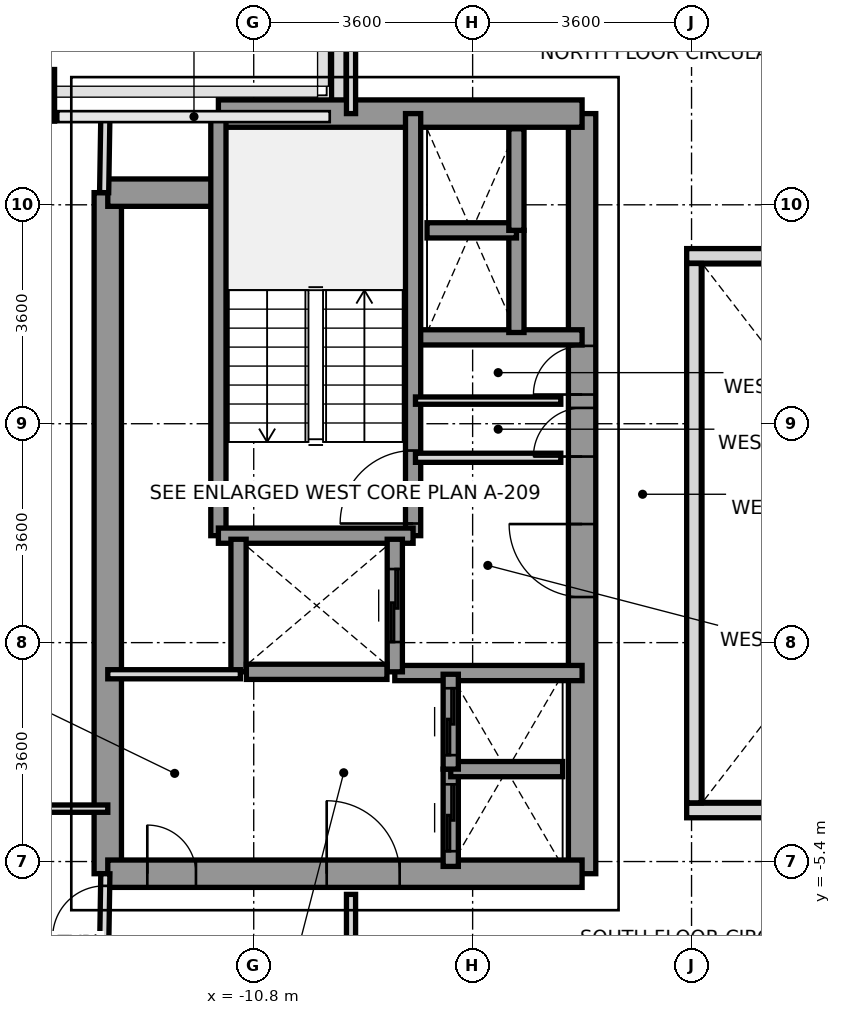
"""IFC4 building model, lengths in metres.
Left out: names, types, materials, properties, quantities, classifications, styles, units other than length and angle.
Written with IfcOpenShell. Run it as: python <this file> out.ifc"""

import sys

from ifc_helpers import new_model, si_unit, direction, frame, frame_2d, origin, origin_2d, place, context, subcontext, project, spatial, rectangle, extrude, source, transform, mapped, element, fill, save


model = new_model("IFC4")
c1 = context("Model", 3, precision=1e-05, world=origin(), true_north=direction((0.0, 1.0)))
c2 = subcontext(c1, "Body", "Model", "MODEL_VIEW")
j1 = project(units=[si_unit("LENGTHUNIT", "METRE"), si_unit("PLANEANGLEUNIT", "RADIAN")], contexts=[c1])
p1 = place(None, origin())
s1 = spatial("IfcSite", under=j1, at=p1, CompositionType="ELEMENT")
p2 = place(p1, origin())
s2 = spatial("IfcBuilding", under=s1, at=p2, CompositionType="ELEMENT")
p3 = place(p2, frame((0.0, 0.0, 114.2)))
s3 = spatial("IfcBuildingStorey", under=s2, at=p3, CompositionType="ELEMENT", Elevation=114.2)
m1 = source(origin(), c2, "Body", "SweptSolid", [
    extrude(rectangle(XDim=0.65, YDim=0.85, at=origin_2d()), origin(), (0.0, 0.0, 1.0), 3.2),
])
p4 = place(p3, frame((-14.4, 7.2, 0.0), z_axis=(0.0, 0.0, 1.0), x_axis=(1.0, 0.0, 0.0)))
e1 = element("IfcColumn", 1, at=p4, inside=s3, PredefinedType="COLUMN", context=c2, shape_type="MappedRepresentation", body=[
    mapped(m1, transform((0.0, 0.0, 0.0), x_axis=(1.0, 0.0, 0.0), y_axis=(0.0, 1.0, 0.0), z_axis=(0.0, 0.0, 1.0), scale=1.0)),
])
p5 = place(p3, frame((-9.4, 6.953, 0.0), z_axis=(0.0, 0.0, 1.0), x_axis=(0.0, 1.0, 0.0)))
e2 = element("IfcWall", 2, at=p5, inside=s3, PredefinedType="PARAPET", context=c2, shape_type="SweptSolid", body=[
    extrude(rectangle(XDim=1.519, YDim=0.24, at=frame_2d((0.76, 0.0))), origin(), (0.0, 0.0, 1.0), 1.15),
])
p6 = place(p3, frame((-13.2, -5.6, 0.0), z_axis=(0.0, 0.0, 1.0), x_axis=(0.0, 1.0, 0.0)))
e3 = element("IfcWall", 3, at=p6, inside=s3, PredefinedType="SHEAR", context=c2, shape_type="SweptSolid", body=[
    extrude(rectangle(XDim=11.2, YDim=0.45, at=frame_2d((5.6, 0.0))), origin(), (0.0, 0.0, 1.0), 3.2),
])
p7 = place(p3, frame((-5.4, -5.6, 0.0), z_axis=(0.0, 0.0, 1.0), x_axis=(0.0, 1.0, 0.0)))
e4 = element("IfcWall", 4, at=p7, inside=s3, PredefinedType="SHEAR", context=c2, shape_type="SweptSolid", body=[
    extrude(rectangle(XDim=12.5, YDim=0.45, at=frame_2d((6.25, 0.0))), origin(), (0.0, 0.0, 1.0), 3.2),
])
p8 = place(p7, frame((4.55, 0.0, 0.0)))
e5 = element("IfcOpeningElement", 5, at=p8, cuts=e4, PredefinedType="OPENING", context=c2, shape_type="SweptSolid", body=[
    extrude(rectangle(XDim=1.2, YDim=2.2, at=frame_2d((0.6, 1.1))), frame((0.0, 0.235, 0.0), z_axis=(0.0, -1.0, 0.0), x_axis=(1.0, 0.0, 0.0)), (0.0, 0.0, 1.0), 0.47),
])
p9 = place(p7, frame((6.86, 0.0, 0.0)))
e6 = element("IfcOpeningElement", 6, at=p9, cuts=e4, PredefinedType="OPENING", context=c2, shape_type="SweptSolid", body=[
    extrude(rectangle(XDim=0.8, YDim=2.1, at=frame_2d((0.4, 1.05))), frame((0.0, 0.235, 0.0), z_axis=(0.0, -1.0, 0.0), x_axis=(1.0, 0.0, 0.0)), (0.0, 0.0, 1.0), 0.47),
])
p10 = place(p7, frame((7.88, 0.0, 0.0)))
e7 = element("IfcOpeningElement", 7, at=p10, cuts=e4, PredefinedType="OPENING", context=c2, shape_type="SweptSolid", body=[
    extrude(rectangle(XDim=0.8, YDim=2.1, at=frame_2d((0.4, 1.05))), frame((0.0, 0.235, 0.0), z_axis=(0.0, -1.0, 0.0), x_axis=(1.0, 0.0, 0.0)), (0.0, 0.0, 1.0), 0.47),
])
p11 = place(p3, frame((-11.381, 6.9, 0.0), z_axis=(0.0, 0.0, 1.0), x_axis=(1.0, 0.0, 0.0)))
e8 = element("IfcWall", 8, at=p11, inside=s3, PredefinedType="SHEAR", context=c2, shape_type="SweptSolid", body=[
    extrude(rectangle(XDim=5.981, YDim=0.45, at=frame_2d((2.991, 0.0))), origin(), (0.0, 0.0, 1.0), 3.2),
])
p12 = place(p3, frame((-13.2, 5.6, 0.0), z_axis=(0.0, 0.0, 1.0), x_axis=(1.0, 0.0, 0.0)))
e9 = element("IfcWall", 9, at=p12, inside=s3, PredefinedType="SHEAR", context=c2, shape_type="SweptSolid", body=[
    extrude(rectangle(XDim=1.819, YDim=0.45, at=frame_2d((0.909, 0.0))), origin(), (0.0, 0.0, 1.0), 3.2),
])
p13 = place(p3, frame((-13.2, -5.6, 0.0), z_axis=(0.0, 0.0, 1.0), x_axis=(1.0, 0.0, 0.0)))
e10 = element("IfcWall", 10, at=p13, inside=s3, PredefinedType="SHEAR", context=c2, shape_type="SweptSolid", body=[
    extrude(rectangle(XDim=7.8, YDim=0.45, at=frame_2d((3.9, 0.0))), origin(), (0.0, 0.0, 1.0), 3.2),
])
p14 = place(p13, frame((3.6, 0.0, 0.0)))
e11 = element("IfcOpeningElement", 11, at=p14, cuts=e10, PredefinedType="OPENING", context=c2, shape_type="SweptSolid", body=[
    extrude(rectangle(XDim=1.2, YDim=2.2, at=frame_2d((0.6, 1.1))), frame((0.0, 0.235, 0.0), z_axis=(0.0, -1.0, 0.0), x_axis=(1.0, 0.0, 0.0)), (0.0, 0.0, 1.0), 0.47),
])
p15 = place(p13, frame((0.65, 0.0, 0.0)))
e12 = element("IfcOpeningElement", 12, at=p15, cuts=e10, PredefinedType="OPENING", context=c2, shape_type="SweptSolid", body=[
    extrude(rectangle(XDim=0.8, YDim=2.1, at=frame_2d((0.4, 1.05))), frame((0.0, 0.235, 0.0), z_axis=(0.0, -1.0, 0.0), x_axis=(1.0, 0.0, 0.0)), (0.0, 0.0, 1.0), 0.47),
])
p16 = place(p3, frame((-8.18, 3.22, 0.0), z_axis=(0.0, 0.0, 1.0), x_axis=(1.0, 0.0, 0.0)))
e13 = element("IfcWall", 13, at=p16, inside=s3, PredefinedType="SOLIDWALL", context=c2, shape_type="SweptSolid", body=[
    extrude(rectangle(XDim=2.78, YDim=0.25, at=frame_2d((1.39, 0.0))), origin(), (0.0, 0.0, 1.0), 3.2),
])
p17 = place(p3, frame((-8.48, -2.3, 0.0), z_axis=(0.0, 0.0, 1.0), x_axis=(1.0, 0.0, 0.0)))
e14 = element("IfcWall", 14, at=p17, inside=s3, PredefinedType="SOLIDWALL", context=c2, shape_type="SweptSolid", body=[
    extrude(rectangle(XDim=3.08, YDim=0.25, at=frame_2d((1.54, 0.0))), origin(), (0.0, 0.0, 1.0), 3.2),
])
p18 = place(p3, frame((-8.179, -0.041, 0.0), z_axis=(0.0, 0.0, 1.0), x_axis=(0.0, 1.0, 0.0)))
e15 = element("IfcWall", 15, at=p18, inside=s3, PredefinedType="SOLIDWALL", context=c2, shape_type="SweptSolid", body=[
    extrude(rectangle(XDim=6.941, YDim=0.25, at=frame_2d((3.47, 0.0))), origin(), (0.0, 0.0, 1.0), 3.2),
])
p19 = place(p18, frame((0.2, 0.0, 0.0)))
e16 = element("IfcOpeningElement", 16, at=p19, cuts=e15, PredefinedType="OPENING", context=c2, shape_type="SweptSolid", body=[
    extrude(rectangle(XDim=1.2, YDim=2.2, at=frame_2d((0.6, 1.1))), frame((0.0, 0.135, 0.0), z_axis=(0.0, -1.0, 0.0), x_axis=(1.0, 0.0, 0.0)), (0.0, 0.0, 1.0), 0.27),
])
p20 = place(p3, frame((-11.381, -0.041, 0.0), z_axis=(0.0, 0.0, 1.0), x_axis=(0.0, 1.0, 0.0)))
e17 = element("IfcWall", 17, at=p20, inside=s3, PredefinedType="SOLIDWALL", context=c2, shape_type="SweptSolid", body=[
    extrude(rectangle(XDim=6.941, YDim=0.25, at=frame_2d((3.47, 0.0))), origin(), (0.0, 0.0, 1.0), 3.2),
])
p21 = place(p3, frame((-11.381, -0.041, 0.0), z_axis=(0.0, 0.0, 1.0), x_axis=(1.0, 0.0, 0.0)))
e18 = element("IfcWall", 18, at=p21, inside=s3, PredefinedType="SOLIDWALL", context=c2, shape_type="SweptSolid", body=[
    extrude(rectangle(XDim=3.202, YDim=0.25, at=frame_2d((1.601, 0.0))), origin(), (0.0, 0.0, 1.0), 3.2),
])
p22 = place(p3, frame((-11.05, -2.28, 0.0), z_axis=(0.0, 0.0, 1.0), x_axis=(0.0, 1.0, 0.0)))
e19 = element("IfcWall", 19, at=p22, inside=s3, PredefinedType="SOLIDWALL", context=c2, shape_type="SweptSolid", body=[
    extrude(rectangle(XDim=2.18, YDim=0.25, at=frame_2d((1.09, 0.0))), origin(), (0.0, 0.0, 1.0), 3.2),
])
p23 = place(p3, frame((-8.48, -2.28, 0.0), z_axis=(0.0, 0.0, 1.0), x_axis=(0.0, 1.0, 0.0)))
e20 = element("IfcWall", 20, at=p23, inside=s3, PredefinedType="SOLIDWALL", context=c2, shape_type="SweptSolid", body=[
    extrude(rectangle(XDim=2.18, YDim=0.25, at=frame_2d((1.09, 0.0))), origin(), (0.0, 0.0, 1.0), 3.2),
])
p24 = place(p23, frame((0.49, 0.0, 0.0)))
e21 = element("IfcOpeningElement", 21, at=p24, cuts=e20, PredefinedType="OPENING", context=c2, shape_type="SweptSolid", body=[
    extrude(rectangle(XDim=1.2, YDim=2.2, at=frame_2d((0.6, 1.1))), frame((0.0, 0.135, 0.0), z_axis=(0.0, -1.0, 0.0), x_axis=(1.0, 0.0, 0.0)), (0.0, 0.0, 1.0), 0.27),
])
p25 = place(p3, frame((-10.921, -2.28, 0.0), z_axis=(0.0, 0.0, 1.0), x_axis=(1.0, 0.0, 0.0)))
e22 = element("IfcWall", 22, at=p25, inside=s3, PredefinedType="SOLIDWALL", context=c2, shape_type="SweptSolid", body=[
    extrude(rectangle(XDim=2.312, YDim=0.25, at=frame_2d((1.156, 0.0))), origin(), (0.0, 0.0, 1.0), 3.2),
])
p26 = place(p3, frame((-7.56, -5.48, 0.0), z_axis=(0.0, 0.0, 1.0), x_axis=(0.0, 1.0, 0.0)))
e23 = element("IfcWall", 23, at=p26, inside=s3, PredefinedType="SOLIDWALL", context=c2, shape_type="SweptSolid", body=[
    extrude(rectangle(XDim=1.6, YDim=0.25, at=frame_2d((0.8, 0.0))), origin(), (0.0, 0.0, 1.0), 3.2),
])
p27 = place(p26, frame((0.25, 0.0, 0.0)))
e24 = element("IfcOpeningElement", 24, at=p27, cuts=e23, PredefinedType="OPENING", context=c2, shape_type="SweptSolid", body=[
    extrude(rectangle(XDim=1.1, YDim=2.2, at=frame_2d((0.55, 1.1))), frame((0.0, 0.135, 0.0), z_axis=(0.0, -1.0, 0.0), x_axis=(1.0, 0.0, 0.0)), (0.0, 0.0, 1.0), 0.27),
])
p28 = place(p3, frame((-7.56, -3.88, 0.0), z_axis=(0.0, 0.0, 1.0), x_axis=(1.0, 0.0, 0.0)))
e25 = element("IfcWall", 25, at=p28, inside=s3, PredefinedType="SOLIDWALL", context=c2, shape_type="SweptSolid", body=[
    extrude(rectangle(XDim=1.84, YDim=0.25, at=frame_2d((0.92, 0.0))), origin(), (0.0, 0.0, 1.0), 3.2),
])
p29 = place(p3, frame((-7.56, -3.88, 0.0), z_axis=(0.0, 0.0, 1.0), x_axis=(0.0, 1.0, 0.0)))
e26 = element("IfcWall", 26, at=p29, inside=s3, PredefinedType="SOLIDWALL", context=c2, shape_type="SweptSolid", body=[
    extrude(rectangle(XDim=1.56, YDim=0.25, at=frame_2d((0.78, 0.0))), origin(), (0.0, 0.0, 1.0), 3.2),
])
p30 = place(p29, frame((0.23, 0.0, 0.0)))
e27 = element("IfcOpeningElement", 27, at=p30, cuts=e26, PredefinedType="OPENING", context=c2, shape_type="SweptSolid", body=[
    extrude(rectangle(XDim=1.1, YDim=2.2, at=frame_2d((0.55, 1.1))), frame((0.0, 0.135, 0.0), z_axis=(0.0, -1.0, 0.0), x_axis=(1.0, 0.0, 0.0)), (0.0, 0.0, 1.0), 0.27),
])
p31 = place(p3, frame((-6.48, 3.3, 0.0), z_axis=(0.0, 0.0, 1.0), x_axis=(0.0, 1.0, 0.0)))
e28 = element("IfcWall", 28, at=p31, inside=s3, PredefinedType="SOLIDWALL", context=c2, shape_type="SweptSolid", body=[
    extrude(rectangle(XDim=1.68, YDim=0.25, at=frame_2d((0.84, 0.0))), origin(), (0.0, 0.0, 1.0), 3.2),
])
p32 = place(p3, frame((-7.95, 4.98, 0.0), z_axis=(0.0, 0.0, 1.0), x_axis=(1.0, 0.0, 0.0)))
e29 = element("IfcWall", 29, at=p32, inside=s3, PredefinedType="SOLIDWALL", context=c2, shape_type="SweptSolid", body=[
    extrude(rectangle(XDim=1.47, YDim=0.25, at=frame_2d((0.735, 0.0))), origin(), (0.0, 0.0, 1.0), 3.2),
])
p33 = place(p3, frame((-6.48, 4.98, 0.0), z_axis=(0.0, 0.0, 1.0), x_axis=(0.0, 1.0, 0.0)))
e30 = element("IfcWall", 30, at=p33, inside=s3, PredefinedType="SOLIDWALL", context=c2, shape_type="SweptSolid", body=[
    extrude(rectangle(XDim=1.67, YDim=0.25, at=frame_2d((0.835, 0.0))), origin(), (0.0, 0.0, 1.0), 3.2),
])
p34 = place(p3, frame((-8.14, 1.24, 0.0), z_axis=(0.0, 0.0, 1.0), x_axis=(1.0, 0.0, 0.0)))
e31 = element("IfcWall", 31, at=p34, inside=s3, PredefinedType="PARTITIONING", context=c2, shape_type="SweptSolid", body=[
    extrude(rectangle(XDim=2.39, YDim=0.15, at=frame_2d((1.195, 0.0))), origin(), (0.0, 0.0, 1.0), 2.3),
])
p35 = place(p3, frame((-8.14, 2.18, 0.0), z_axis=(0.0, 0.0, 1.0), x_axis=(1.0, 0.0, 0.0)))
e32 = element("IfcWall", 32, at=p35, inside=s3, PredefinedType="PARTITIONING", context=c2, shape_type="SweptSolid", body=[
    extrude(rectangle(XDim=2.39, YDim=0.12, at=frame_2d((1.195, 0.0))), origin(), (0.0, 0.0, 1.0), 2.3),
])
p36 = place(p3, frame((-13.2, -2.32, 0.0), z_axis=(0.0, 0.0, 1.0), x_axis=(1.0, 0.0, 0.0)))
e33 = element("IfcWall", 33, at=p36, inside=s3, PredefinedType="PARTITIONING", context=c2, shape_type="SweptSolid", body=[
    extrude(rectangle(XDim=2.18, YDim=0.15, at=frame_2d((1.09, 0.0))), origin(), (0.0, 0.0, 1.0), 3.2),
])
p37 = place(p3, frame((-9.2, 6.9, 0.0), z_axis=(0.0, 0.0, 1.0), x_axis=(0.0, 1.0, 0.0)))
e34 = element("IfcWall", 34, at=p37, inside=s3, PredefinedType="PARTITIONING", context=c2, shape_type="SweptSolid", body=[
    extrude(rectangle(XDim=8.78, YDim=0.15, at=frame_2d((4.39, 0.0))), origin(), (0.0, 0.0, 1.0), 2.7),
])
p38 = place(p3, frame((-9.2, -15.68, 0.0), z_axis=(0.0, 0.0, 1.0), x_axis=(0.0, 1.0, 0.0)))
e35 = element("IfcWall", 35, at=p38, inside=s3, PredefinedType="PARTITIONING", context=c2, shape_type="SweptSolid", body=[
    extrude(rectangle(XDim=9.74, YDim=0.15, at=frame_2d((4.87, 0.0))), origin(), (0.0, 0.0, 1.0), 2.7),
])
p39 = place(p3, frame((-13.26, 5.6, 0.0), z_axis=(0.0, 0.0, 1.0), x_axis=(0.016013571389, 0.999871774545, 0.0)))
e36 = element("IfcWall", 36, at=p39, inside=s3, PredefinedType="PARTITIONING", context=c2, shape_type="SweptSolid", body=[
    extrude(rectangle(XDim=1.25, YDim=0.15, at=frame_2d((0.625, 0.0))), origin(), (0.0, 0.0, 1.0), 3.2),
])
p40 = place(p3, frame((-13.26, -6.85, 0.0), z_axis=(0.0, 0.0, 1.0), x_axis=(0.016013571389, 0.999871774545, 0.0)))
e37 = element("IfcWall", 37, at=p40, inside=s3, PredefinedType="PARTITIONING", context=c2, shape_type="SweptSolid", body=[
    extrude(rectangle(XDim=1.25, YDim=0.15, at=frame_2d((0.625, 0.0))), origin(), (0.0, 0.0, 1.0), 3.2),
])
p41 = place(p40, frame((0.2, 0.0, 0.0)))
e38 = element("IfcOpeningElement", 38, at=p41, cuts=e37, PredefinedType="OPENING", context=c2, shape_type="SweptSolid", body=[
    extrude(rectangle(XDim=0.85, YDim=2.1, at=frame_2d((0.425, 1.05))), frame((0.0, 0.085, 0.0), z_axis=(0.0, -1.0, 0.0), x_axis=(1.0, 0.0, 0.0)), (0.0, 0.0, 1.0), 0.17),
])
p42 = place(p3, frame((-23.3, -4.53, 0.0), z_axis=(0.0, 0.0, 1.0), x_axis=(1.0, 0.0, 0.0)))
e39 = element("IfcWall", 39, at=p42, inside=s3, PredefinedType="PARTITIONING", context=c2, shape_type="SweptSolid", body=[
    extrude(rectangle(XDim=10.1, YDim=0.12, at=frame_2d((5.05, 0.0))), origin(), (0.0, 0.0, 1.0), 2.75),
])
p43 = place(p42, frame((1.5, 0.0, 0.0)))
e40 = element("IfcOpeningElement", 40, at=p43, cuts=e39, PredefinedType="OPENING", context=c2, shape_type="SweptSolid", body=[
    extrude(rectangle(XDim=0.95, YDim=2.15, at=frame_2d((0.475, 1.075))), frame((0.0, 0.07, 0.0), z_axis=(0.0, -1.0, 0.0), x_axis=(1.0, 0.0, 0.0)), (0.0, 0.0, 1.0), 0.14),
])
for number, where, z_axis, x_axis in (
    (41, (-3.68, -4.56, 0.0), (0.0, 0.0, 1.0), (1.0, 0.0, 0.0)),
    (42, (-3.68, 4.56, 0.0), (0.0, 0.0, 1.0), (1.0, 0.0, 0.0)),
):
    element("IfcWall", number, at=place(p3, frame(where, z_axis=z_axis, x_axis=x_axis)), inside=s3, PredefinedType="PARAPET", context=c2, shape_type="SweptSolid", body=[
        extrude(rectangle(XDim=7.36, YDim=0.24, at=frame_2d((3.68, 0.0))), origin(), (0.0, 0.0, 1.0), 1.15),
    ])
p44 = place(p3, frame((-3.56, -4.435, 0.0), z_axis=(0.0, 0.0, 1.0), x_axis=(0.0, 1.0, 0.0)))
e43 = element("IfcWall", 43, at=p44, inside=s3, PredefinedType="PARAPET", context=c2, shape_type="SweptSolid", body=[
    extrude(rectangle(XDim=8.87, YDim=0.24, at=frame_2d((4.435, 0.0))), origin(), (0.0, 0.0, 1.0), 1.15),
])
m2 = source(origin(), c2, "Body", "SweptSolid", [
    extrude(rectangle(XDim=1.2, YDim=2.2, at=frame_2d((0.6, 1.1))), frame((0.0, 0.025, 0.0), z_axis=(0.0, -1.0, 0.0), x_axis=(1.0, 0.0, 0.0)), (0.0, 0.0, 1.0), 0.05),
])
p45 = place(p19, origin())
e44 = element("IfcDoor", 44, at=p45, inside=s3, OperationType="SINGLE_SWING_LEFT", PredefinedType="DOOR", context=c2, shape_type="MappedRepresentation", body=[
    mapped(m2, transform((0.0, 0.0, 0.0), x_axis=(1.0, 0.0, 0.0), y_axis=(0.0, 1.0, 0.0), z_axis=(0.0, 0.0, 1.0), scale=1.0)),
])
fill(e16, e44)
p46 = place(p8, origin())
e45 = element("IfcDoor", 45, at=p46, inside=s3, OperationType="SINGLE_SWING_RIGHT", PredefinedType="DOOR", context=c2, shape_type="MappedRepresentation", body=[
    mapped(m2, transform((0.0, 0.0, 0.0), x_axis=(1.0, 0.0, 0.0), y_axis=(0.0, 1.0, 0.0), z_axis=(0.0, 0.0, 1.0), scale=1.0)),
])
fill(e5, e45)
p47 = place(p14, origin())
e46 = element("IfcDoor", 46, at=p47, inside=s3, OperationType="SINGLE_SWING_LEFT", PredefinedType="DOOR", context=c2, shape_type="MappedRepresentation", body=[
    mapped(m2, transform((0.0, 0.0, 0.0), x_axis=(1.0, 0.0, 0.0), y_axis=(0.0, 1.0, 0.0), z_axis=(0.0, 0.0, 1.0), scale=1.0)),
])
fill(e11, e46)
m3 = source(origin(), c2, "Body", "SweptSolid", [
    extrude(rectangle(XDim=0.8, YDim=2.1, at=frame_2d((0.4, 1.05))), frame((0.0, 0.025, 0.0), z_axis=(0.0, -1.0, 0.0), x_axis=(1.0, 0.0, 0.0)), (0.0, 0.0, 1.0), 0.05),
])
p48 = place(p9, origin())
e47 = element("IfcDoor", 47, at=p48, inside=s3, OperationType="SINGLE_SWING_LEFT", PredefinedType="DOOR", context=c2, shape_type="MappedRepresentation", body=[
    mapped(m3, transform((0.0, 0.0, 0.0), x_axis=(1.0, 0.0, 0.0), y_axis=(0.0, 1.0, 0.0), z_axis=(0.0, 0.0, 1.0), scale=1.0)),
])
fill(e6, e47)
p49 = place(p10, origin())
e48 = element("IfcDoor", 48, at=p49, inside=s3, OperationType="SINGLE_SWING_LEFT", PredefinedType="DOOR", context=c2, shape_type="MappedRepresentation", body=[
    mapped(m3, transform((0.0, 0.0, 0.0), x_axis=(1.0, 0.0, 0.0), y_axis=(0.0, 1.0, 0.0), z_axis=(0.0, 0.0, 1.0), scale=1.0)),
])
fill(e7, e48)
p50 = place(p15, origin())
e49 = element("IfcDoor", 49, at=p50, inside=s3, OperationType="SINGLE_SWING_LEFT", PredefinedType="DOOR", context=c2, shape_type="MappedRepresentation", body=[
    mapped(m3, transform((0.0, 0.0, 0.0), x_axis=(1.0, 0.0, 0.0), y_axis=(0.0, 1.0, 0.0), z_axis=(0.0, 0.0, 1.0), scale=1.0)),
])
fill(e12, e49)
p51 = place(p24, origin())
e50 = element("IfcDoor", 50, at=p51, inside=s3, OperationType="SLIDING_TO_RIGHT", PredefinedType="DOOR", context=c2, shape_type="MappedRepresentation", body=[
    mapped(m2, transform((0.0, 0.0, 0.0), x_axis=(1.0, 0.0, 0.0), y_axis=(0.0, 1.0, 0.0), z_axis=(0.0, 0.0, 1.0), scale=1.0)),
])
fill(e21, e50)
m4 = source(origin(), c2, "Body", "SweptSolid", [
    extrude(rectangle(XDim=1.1, YDim=2.2, at=frame_2d((0.55, 1.1))), frame((0.0, 0.025, 0.0), z_axis=(0.0, -1.0, 0.0), x_axis=(1.0, 0.0, 0.0)), (0.0, 0.0, 1.0), 0.05),
])
p52 = place(p27, origin())
e51 = element("IfcDoor", 51, at=p52, inside=s3, OperationType="SLIDING_TO_LEFT", PredefinedType="DOOR", context=c2, shape_type="MappedRepresentation", body=[
    mapped(m4, transform((0.0, 0.0, 0.0), x_axis=(1.0, 0.0, 0.0), y_axis=(0.0, 1.0, 0.0), z_axis=(0.0, 0.0, 1.0), scale=1.0)),
])
fill(e24, e51)
p53 = place(p30, origin())
e52 = element("IfcDoor", 52, at=p53, inside=s3, OperationType="SLIDING_TO_LEFT", PredefinedType="DOOR", context=c2, shape_type="MappedRepresentation", body=[
    mapped(m4, transform((0.0, 0.0, 0.0), x_axis=(1.0, 0.0, 0.0), y_axis=(0.0, 1.0, 0.0), z_axis=(0.0, 0.0, 1.0), scale=1.0)),
])
fill(e27, e52)
m5 = source(origin(), c2, "Body", "SweptSolid", [
    extrude(rectangle(XDim=0.85, YDim=2.1, at=frame_2d((0.425, 1.05))), frame((0.0, 0.025, 0.0), z_axis=(0.0, -1.0, 0.0), x_axis=(1.0, 0.0, 0.0)), (0.0, 0.0, 1.0), 0.05),
])
p54 = place(p41, origin())
e53 = element("IfcDoor", 53, at=p54, inside=s3, OperationType="SINGLE_SWING_LEFT", PredefinedType="DOOR", context=c2, shape_type="MappedRepresentation", body=[
    mapped(m5, transform((0.0, 0.0, 0.0), x_axis=(1.0, 0.0, 0.0), y_axis=(0.0, 1.0, 0.0), z_axis=(0.0, 0.0, 1.0), scale=1.0)),
])
fill(e38, e53)
save(model, sys.argv[1])
